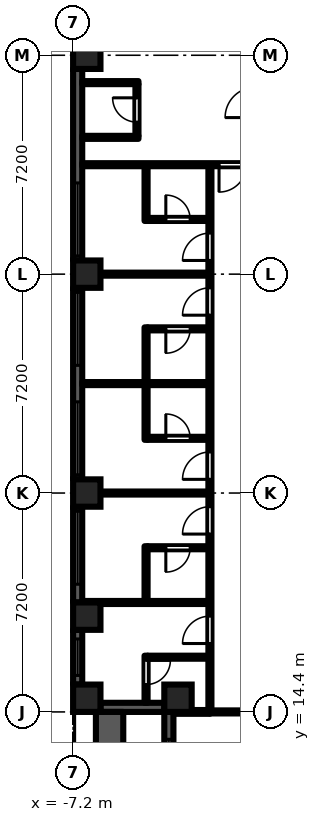
"""IFC4 building model, lengths in metres.
Left out: names, types, materials, properties, quantities, classifications, styles, units other than length and angle.
Written with IfcOpenShell. Run it as: python <this file> out.ifc"""

import sys

from ifc_helpers import new_model, si_unit, direction, frame, frame_2d, origin, origin_2d, place, context, subcontext, project, spatial, rectangle, extrude, element, fill, save


model = new_model("IFC4")
c1 = context("Model", 3, precision=1e-05, world=origin(), true_north=direction((0.0, 1.0)))
c2 = subcontext(c1, "Body", "Model", "MODEL_VIEW")
j1 = project(units=[si_unit("LENGTHUNIT", "METRE"), si_unit("PLANEANGLEUNIT", "RADIAN")], contexts=[c1])
p1 = place(None, origin())
s1 = spatial("IfcSite", under=j1, at=p1, CompositionType="ELEMENT")
p2 = place(p1, origin())
s2 = spatial("IfcBuilding", under=s1, at=p2, CompositionType="ELEMENT")
p3 = place(p2, frame((0.0, 0.0, 11.7)))
s3 = spatial("IfcBuildingStorey", under=s2, at=p3, CompositionType="ELEMENT", Elevation=11.7)
for number, where, z_axis, x_axis in (
    (1, (-6.75, 14.85, 0.0), (0.0, 0.0, 1.0), (1.0, 0.0, 0.0)),
    (2, (-6.75, 17.55, 0.0), (0.0, 0.0, 1.0), (1.0, 0.0, 0.0)),
    (3, (-6.75, 21.6, 0.0), (0.0, 0.0, 1.0), (1.0, 0.0, 0.0)),
    (4, (-6.75, 28.8, 0.0), (0.0, 0.0, 1.0), (1.0, 0.0, 0.0)),
    (5, (-6.75, 36.0, 0.0), (0.0, 0.0, 1.0), (1.0, 0.0, 0.0)),
    (6, (-3.75, 14.85, 0.0), (0.0, 0.0, 1.0), (1.0, 0.0, 0.0)),
):
    element("IfcColumn", number, at=place(p3, frame(where, z_axis=z_axis, x_axis=x_axis)), inside=s3, PredefinedType="COLUMN", context=c2, shape_type="SweptSolid", body=[
        extrude(rectangle(XDim=0.9, YDim=0.9, at=origin_2d()), origin(), (0.0, 0.0, 1.0), 3.0),
    ])
p4 = place(p3, frame((-7.05, 35.55, 0.0), z_axis=(0.0, 0.0, 1.0), x_axis=(0.0, -1.0, 0.0)))
e7 = element("IfcWall", 7, at=p4, inside=s3, PredefinedType="SOLIDWALL", context=c2, shape_type="SweptSolid", body=[
    extrude(rectangle(XDim=6.3, YDim=0.3, at=frame_2d((3.15, 0.0))), origin(), (0.0, 0.0, 1.0), 2.1),
])
p5 = place(p4, frame((3.75, 0.0, 0.2)))
e8 = element("IfcOpeningElement", 8, at=p5, cuts=e7, PredefinedType="OPENING", context=c2, shape_type="SweptSolid", body=[
    extrude(rectangle(XDim=2.4, YDim=1.85, at=frame_2d((1.2, 0.925))), frame((0.0, 0.16, 0.0), z_axis=(0.0, -1.0, 0.0), x_axis=(1.0, 0.0, 0.0)), (0.0, 0.0, 1.0), 0.32),
])
p6 = place(p3, frame((-7.05, 28.35, 0.0), z_axis=(0.0, 0.0, 1.0), x_axis=(0.0, -1.0, 0.0)))
e9 = element("IfcWall", 9, at=p6, inside=s3, PredefinedType="SOLIDWALL", context=c2, shape_type="SweptSolid", body=[
    extrude(rectangle(XDim=6.3, YDim=0.3, at=frame_2d((3.15, 0.0))), origin(), (0.0, 0.0, 1.0), 2.1),
])
p7 = place(p6, frame((0.15, 0.0, 0.2)))
e10 = element("IfcOpeningElement", 10, at=p7, cuts=e9, PredefinedType="OPENING", context=c2, shape_type="SweptSolid", body=[
    extrude(rectangle(XDim=2.4, YDim=1.85, at=frame_2d((1.2, 0.925))), frame((0.0, 0.16, 0.0), z_axis=(0.0, -1.0, 0.0), x_axis=(1.0, 0.0, 0.0)), (0.0, 0.0, 1.0), 0.32),
])
p8 = place(p6, frame((3.75, 0.0, 0.2)))
e11 = element("IfcOpeningElement", 11, at=p8, cuts=e9, PredefinedType="OPENING", context=c2, shape_type="SweptSolid", body=[
    extrude(rectangle(XDim=2.4, YDim=1.85, at=frame_2d((1.2, 0.925))), frame((0.0, 0.16, 0.0), z_axis=(0.0, -1.0, 0.0), x_axis=(1.0, 0.0, 0.0)), (0.0, 0.0, 1.0), 0.32),
])
p9 = place(p3, frame((-7.05, 21.15, 0.0), z_axis=(0.0, 0.0, 1.0), x_axis=(0.0, -1.0, 0.0)))
e12 = element("IfcWall", 12, at=p9, inside=s3, PredefinedType="SOLIDWALL", context=c2, shape_type="SweptSolid", body=[
    extrude(rectangle(XDim=3.15, YDim=0.3, at=frame_2d((1.575, 0.0))), origin(), (0.0, 0.0, 1.0), 2.1),
])
p10 = place(p9, frame((0.15, 0.0, 0.2)))
e13 = element("IfcOpeningElement", 13, at=p10, cuts=e12, PredefinedType="OPENING", context=c2, shape_type="SweptSolid", body=[
    extrude(rectangle(XDim=2.4, YDim=1.85, at=frame_2d((1.2, 0.925))), frame((0.0, 0.16, 0.0), z_axis=(0.0, -1.0, 0.0), x_axis=(1.0, 0.0, 0.0)), (0.0, 0.0, 1.0), 0.32),
])
p11 = place(p3, frame((-7.05, 17.1, 0.0), z_axis=(0.0, 0.0, 1.0), x_axis=(0.0, -1.0, 0.0)))
e14 = element("IfcWall", 14, at=p11, inside=s3, PredefinedType="SOLIDWALL", context=c2, shape_type="SweptSolid", body=[
    extrude(rectangle(XDim=1.8, YDim=0.3, at=frame_2d((0.9, 0.0))), origin(), (0.0, 0.0, 1.0), 2.1),
])
p12 = place(p11, frame((0.3, 0.0, 0.2)))
e15 = element("IfcOpeningElement", 15, at=p12, cuts=e14, PredefinedType="OPENING", context=c2, shape_type="SweptSolid", body=[
    extrude(rectangle(XDim=1.2, YDim=1.85, at=frame_2d((0.6, 0.925))), frame((0.0, 0.16, 0.0), z_axis=(0.0, -1.0, 0.0), x_axis=(1.0, 0.0, 0.0)), (0.0, 0.0, 1.0), 0.32),
])
p13 = place(p3, frame((-6.3, 14.55, 0.0), z_axis=(0.0, 0.0, 1.0), x_axis=(1.0, 0.0, 0.0)))
e16 = element("IfcWall", 16, at=p13, inside=s3, PredefinedType="SOLIDWALL", context=c2, shape_type="SweptSolid", body=[
    extrude(rectangle(XDim=2.1, YDim=0.3, at=frame_2d((1.05, 0.0))), origin(), (0.0, 0.0, 1.0), 2.1),
])
p14 = place(p3, frame((-4.05, 14.4, 0.0), z_axis=(0.0, 0.0, 1.0), x_axis=(0.0, -1.0, 0.0)))
e17 = element("IfcWall", 17, at=p14, inside=s3, PredefinedType="SOLIDWALL", context=c2, shape_type="SweptSolid", body=[
    extrude(rectangle(XDim=7.2, YDim=0.3, at=frame_2d((3.6, 0.0))), origin(), (0.0, 0.0, 1.0), 2.1),
])
p15 = place(p14, frame((3.0, 0.0, 0.0)))
e18 = element("IfcOpeningElement", 18, at=p15, cuts=e17, PredefinedType="OPENING", context=c2, shape_type="SweptSolid", body=[
    extrude(rectangle(XDim=1.2, YDim=2.05, at=frame_2d((0.6, 1.025))), frame((0.0, 0.16, 0.0), z_axis=(0.0, -1.0, 0.0), x_axis=(1.0, 0.0, 0.0)), (0.0, 0.0, 1.0), 0.32),
])
p16 = place(p14, frame((0.9, 0.0, 0.2)))
e19 = element("IfcOpeningElement", 19, at=p16, cuts=e17, PredefinedType="OPENING", context=c2, shape_type="SweptSolid", body=[
    extrude(rectangle(XDim=1.8, YDim=1.85, at=frame_2d((0.9, 0.925))), frame((0.0, 0.16, 0.0), z_axis=(0.0, -1.0, 0.0), x_axis=(1.0, 0.0, 0.0)), (0.0, 0.0, 1.0), 0.32),
])
p17 = place(p14, frame((4.5, 0.0, 0.2)))
e20 = element("IfcOpeningElement", 20, at=p17, cuts=e17, PredefinedType="OPENING", context=c2, shape_type="SweptSolid", body=[
    extrude(rectangle(XDim=1.8, YDim=1.85, at=frame_2d((0.9, 0.925))), frame((0.0, 0.16, 0.0), z_axis=(0.0, -1.0, 0.0), x_axis=(1.0, 0.0, 0.0)), (0.0, 0.0, 1.0), 0.32),
])
p18 = place(p3, frame((-6.0, 7.2, 0.0), z_axis=(0.0, 0.0, 1.0), x_axis=(0.0, 1.0, 0.0)))
e21 = element("IfcWall", 21, at=p18, inside=s3, PredefinedType="PARAPET", context=c2, shape_type="SweptSolid", body=[
    extrude(rectangle(XDim=7.2, YDim=0.9, at=frame_2d((3.6, 0.0))), origin(), (0.0, 0.0, 1.0), 0.8),
])
for number, where, z_axis, x_axis in (
    (22, (-6.9, 18.0, 0.0), (0.0, 0.0, 1.0), (1.0, 0.0, 0.0)),
    (23, (-6.9, 21.6, 0.0), (0.0, 0.0, 1.0), (1.0, 0.0, 0.0)),
    (24, (-6.9, 25.2, 0.0), (0.0, 0.0, 1.0), (1.0, 0.0, 0.0)),
    (25, (-6.9, 28.8, 0.0), (0.0, 0.0, 1.0), (1.0, 0.0, 0.0)),
):
    element("IfcWall", number, at=place(p3, frame(where, z_axis=z_axis, x_axis=x_axis)), inside=s3, PredefinedType="PARTITIONING", context=c2, shape_type="SweptSolid", body=[
        extrude(rectangle(XDim=4.15, YDim=0.1, at=frame_2d((2.075, 0.0))), origin(), (0.0, 0.0, 1.0), 2.575),
    ])
p19 = place(p3, frame((-6.9, 32.4, 0.0), z_axis=(0.0, 0.0, 1.0), x_axis=(1.0, 0.0, 0.0)))
e26 = element("IfcWall", 26, at=p19, inside=s3, PredefinedType="PARTITIONING", context=c2, shape_type="SweptSolid", body=[
    extrude(rectangle(XDim=5.625, YDim=0.1, at=frame_2d((2.812, 0.0))), origin(), (0.0, 0.0, 1.0), 2.575),
])
p20 = place(p19, frame((4.5, 0.0, 0.0)))
e27 = element("IfcOpeningElement", 27, at=p20, cuts=e26, PredefinedType="OPENING", context=c2, shape_type="SweptSolid", body=[
    extrude(rectangle(XDim=0.9, YDim=2.1, at=frame_2d((0.45, 1.05))), frame((0.0, 0.06, 0.0), z_axis=(0.0, -1.0, 0.0), x_axis=(1.0, 0.0, 0.0)), (0.0, 0.0, 1.0), 0.12),
])
for number, where, z_axis, x_axis in (
    (28, (-6.9, 33.3, 0.0), (0.0, 0.0, 1.0), (1.0, 0.0, 0.0)),
    (29, (-6.9, 35.1, 0.0), (0.0, 0.0, 1.0), (1.0, 0.0, 0.0)),
):
    element("IfcWall", number, at=place(p3, frame(where, z_axis=z_axis, x_axis=x_axis)), inside=s3, PredefinedType="PARTITIONING", context=c2, shape_type="SweptSolid", body=[
        extrude(rectangle(XDim=1.85, YDim=0.1, at=frame_2d((0.925, 0.0))), origin(), (0.0, 0.0, 1.0), 2.575),
    ])
p21 = place(p3, frame((-5.1, 33.35, 0.0), z_axis=(0.0, 0.0, 1.0), x_axis=(0.0, 1.0, 0.0)))
e30 = element("IfcWall", 30, at=p21, inside=s3, PredefinedType="PARTITIONING", context=c2, shape_type="SweptSolid", body=[
    extrude(rectangle(XDim=1.7, YDim=0.1, at=frame_2d((0.85, 0.0))), origin(), (0.0, 0.0, 1.0), 2.575),
])
p22 = place(p21, frame((0.45, 0.0, 0.0)))
e31 = element("IfcOpeningElement", 31, at=p22, cuts=e30, PredefinedType="OPENING", context=c2, shape_type="SweptSolid", body=[
    extrude(rectangle(XDim=0.8, YDim=2.1, at=frame_2d((0.4, 1.05))), frame((0.0, 0.06, 0.0), z_axis=(0.0, -1.0, 0.0), x_axis=(1.0, 0.0, 0.0)), (0.0, 0.0, 1.0), 0.12),
])
p23 = place(p3, frame((-4.8, 14.7, 0.0), z_axis=(0.0, 0.0, 1.0), x_axis=(0.0, 1.0, 0.0)))
e32 = element("IfcWall", 32, at=p23, inside=s3, PredefinedType="PARTITIONING", context=c2, shape_type="SweptSolid", body=[
    extrude(rectangle(XDim=1.55, YDim=0.1, at=frame_2d((0.775, 0.0))), origin(), (0.0, 0.0, 1.0), 2.575),
])
p24 = place(p23, frame((0.6, 0.0, 0.0)))
e33 = element("IfcOpeningElement", 33, at=p24, cuts=e32, PredefinedType="OPENING", context=c2, shape_type="SweptSolid", body=[
    extrude(rectangle(XDim=0.8, YDim=2.1, at=frame_2d((0.4, 1.05))), frame((0.0, 0.06, 0.0), z_axis=(0.0, -1.0, 0.0), x_axis=(1.0, 0.0, 0.0)), (0.0, 0.0, 1.0), 0.12),
])
p25 = place(p3, frame((-4.75, 16.2, 0.0), z_axis=(0.0, 0.0, 1.0), x_axis=(1.0, 0.0, 0.0)))
e34 = element("IfcWall", 34, at=p25, inside=s3, PredefinedType="PARTITIONING", context=c2, shape_type="SweptSolid", body=[
    extrude(rectangle(XDim=2.0, YDim=0.1, at=frame_2d((1.0, 0.0))), origin(), (0.0, 0.0, 1.0), 2.575),
])
p26 = place(p3, frame((-4.8, 18.05, 0.0), z_axis=(0.0, 0.0, 1.0), x_axis=(0.0, 1.0, 0.0)))
e35 = element("IfcWall", 35, at=p26, inside=s3, PredefinedType="PARTITIONING", context=c2, shape_type="SweptSolid", body=[
    extrude(rectangle(XDim=1.8, YDim=0.1, at=frame_2d((0.9, 0.0))), origin(), (0.0, 0.0, 1.0), 2.575),
])
p27 = place(p3, frame((-4.75, 19.8, 0.0), z_axis=(0.0, 0.0, 1.0), x_axis=(1.0, 0.0, 0.0)))
e36 = element("IfcWall", 36, at=p27, inside=s3, PredefinedType="PARTITIONING", context=c2, shape_type="SweptSolid", body=[
    extrude(rectangle(XDim=2.0, YDim=0.1, at=frame_2d((1.0, 0.0))), origin(), (0.0, 0.0, 1.0), 2.575),
])
p28 = place(p27, frame((0.6, 0.0, 0.0)))
e37 = element("IfcOpeningElement", 37, at=p28, cuts=e36, PredefinedType="OPENING", context=c2, shape_type="SweptSolid", body=[
    extrude(rectangle(XDim=0.8, YDim=2.1, at=frame_2d((0.4, 1.05))), frame((0.0, 0.06, 0.0), z_axis=(0.0, -1.0, 0.0), x_axis=(1.0, 0.0, 0.0)), (0.0, 0.0, 1.0), 0.12),
])
p29 = place(p3, frame((-4.8, 23.35, 0.0), z_axis=(0.0, 0.0, 1.0), x_axis=(0.0, 1.0, 0.0)))
e38 = element("IfcWall", 38, at=p29, inside=s3, PredefinedType="PARTITIONING", context=c2, shape_type="SweptSolid", body=[
    extrude(rectangle(XDim=3.7, YDim=0.1, at=frame_2d((1.85, 0.0))), origin(), (0.0, 0.0, 1.0), 2.575),
])
p30 = place(p3, frame((-4.75, 23.4, 0.0), z_axis=(0.0, 0.0, 1.0), x_axis=(1.0, 0.0, 0.0)))
e39 = element("IfcWall", 39, at=p30, inside=s3, PredefinedType="PARTITIONING", context=c2, shape_type="SweptSolid", body=[
    extrude(rectangle(XDim=2.0, YDim=0.1, at=frame_2d((1.0, 0.0))), origin(), (0.0, 0.0, 1.0), 2.575),
])
p31 = place(p30, frame((0.6, 0.0, 0.0)))
e40 = element("IfcOpeningElement", 40, at=p31, cuts=e39, PredefinedType="OPENING", context=c2, shape_type="SweptSolid", body=[
    extrude(rectangle(XDim=0.8, YDim=2.1, at=frame_2d((0.4, 1.05))), frame((0.0, 0.06, 0.0), z_axis=(0.0, -1.0, 0.0), x_axis=(1.0, 0.0, 0.0)), (0.0, 0.0, 1.0), 0.12),
])
p32 = place(p3, frame((-4.75, 27.0, 0.0), z_axis=(0.0, 0.0, 1.0), x_axis=(1.0, 0.0, 0.0)))
e41 = element("IfcWall", 41, at=p32, inside=s3, PredefinedType="PARTITIONING", context=c2, shape_type="SweptSolid", body=[
    extrude(rectangle(XDim=2.0, YDim=0.1, at=frame_2d((1.0, 0.0))), origin(), (0.0, 0.0, 1.0), 2.575),
])
p33 = place(p32, frame((0.6, 0.0, 0.0)))
e42 = element("IfcOpeningElement", 42, at=p33, cuts=e41, PredefinedType="OPENING", context=c2, shape_type="SweptSolid", body=[
    extrude(rectangle(XDim=0.8, YDim=2.1, at=frame_2d((0.4, 1.05))), frame((0.0, 0.06, 0.0), z_axis=(0.0, -1.0, 0.0), x_axis=(1.0, 0.0, 0.0)), (0.0, 0.0, 1.0), 0.12),
])
p34 = place(p3, frame((-4.8, 30.55, 0.0), z_axis=(0.0, 0.0, 1.0), x_axis=(0.0, 1.0, 0.0)))
e43 = element("IfcWall", 43, at=p34, inside=s3, PredefinedType="PARTITIONING", context=c2, shape_type="SweptSolid", body=[
    extrude(rectangle(XDim=1.8, YDim=0.1, at=frame_2d((0.9, 0.0))), origin(), (0.0, 0.0, 1.0), 2.575),
])
p35 = place(p3, frame((-4.75, 30.6, 0.0), z_axis=(0.0, 0.0, 1.0), x_axis=(1.0, 0.0, 0.0)))
e44 = element("IfcWall", 44, at=p35, inside=s3, PredefinedType="PARTITIONING", context=c2, shape_type="SweptSolid", body=[
    extrude(rectangle(XDim=2.0, YDim=0.1, at=frame_2d((1.0, 0.0))), origin(), (0.0, 0.0, 1.0), 2.575),
])
p36 = place(p35, frame((0.6, 0.0, 0.0)))
e45 = element("IfcOpeningElement", 45, at=p36, cuts=e44, PredefinedType="OPENING", context=c2, shape_type="SweptSolid", body=[
    extrude(rectangle(XDim=0.8, YDim=2.1, at=frame_2d((0.4, 1.05))), frame((0.0, 0.06, 0.0), z_axis=(0.0, -1.0, 0.0), x_axis=(1.0, 0.0, 0.0)), (0.0, 0.0, 1.0), 0.12),
])
p37 = place(p3, frame((-3.9, 14.4, 0.0), z_axis=(0.0, 0.0, 1.0), x_axis=(1.0, 0.0, 0.0)))
e46 = element("IfcWall", 46, at=p37, inside=s3, PredefinedType="PARTITIONING", context=c2, shape_type="SweptSolid", body=[
    extrude(rectangle(XDim=1.2, YDim=0.125, at=frame_2d((0.6, 0.0))), origin(), (0.0, 0.0, 1.0), 2.575),
])
p38 = place(p3, frame((-2.7, 14.462, 0.0), z_axis=(0.0, 0.0, 1.0), x_axis=(0.0, 1.0, 0.0)))
e47 = element("IfcWall", 47, at=p38, inside=s3, PredefinedType="PARTITIONING", context=c2, shape_type="SweptSolid", body=[
    extrude(rectangle(XDim=17.888, YDim=0.1, at=frame_2d((8.944, 0.0))), origin(), (0.0, 0.0, 1.0), 2.575),
])
p39 = place(p38, frame((2.188, 0.0, 0.0)))
e48 = element("IfcOpeningElement", 48, at=p39, cuts=e47, PredefinedType="OPENING", context=c2, shape_type="SweptSolid", body=[
    extrude(rectangle(XDim=0.9, YDim=2.1, at=frame_2d((0.45, 1.05))), frame((0.0, 0.06, 0.0), z_axis=(0.0, -1.0, 0.0), x_axis=(1.0, 0.0, 0.0)), (0.0, 0.0, 1.0), 0.12),
])
p40 = place(p38, frame((5.788, 0.0, 0.0)))
e49 = element("IfcOpeningElement", 49, at=p40, cuts=e47, PredefinedType="OPENING", context=c2, shape_type="SweptSolid", body=[
    extrude(rectangle(XDim=0.9, YDim=2.1, at=frame_2d((0.45, 1.05))), frame((0.0, 0.06, 0.0), z_axis=(0.0, -1.0, 0.0), x_axis=(1.0, 0.0, 0.0)), (0.0, 0.0, 1.0), 0.12),
])
p41 = place(p38, frame((7.587, 0.0, 0.0)))
e50 = element("IfcOpeningElement", 50, at=p41, cuts=e47, PredefinedType="OPENING", context=c2, shape_type="SweptSolid", body=[
    extrude(rectangle(XDim=0.9, YDim=2.1, at=frame_2d((0.45, 1.05))), frame((0.0, 0.06, 0.0), z_axis=(0.0, -1.0, 0.0), x_axis=(1.0, 0.0, 0.0)), (0.0, 0.0, 1.0), 0.12),
])
p42 = place(p38, frame((12.988, 0.0, 0.0)))
e51 = element("IfcOpeningElement", 51, at=p42, cuts=e47, PredefinedType="OPENING", context=c2, shape_type="SweptSolid", body=[
    extrude(rectangle(XDim=0.9, YDim=2.1, at=frame_2d((0.45, 1.05))), frame((0.0, 0.06, 0.0), z_axis=(0.0, -1.0, 0.0), x_axis=(1.0, 0.0, 0.0)), (0.0, 0.0, 1.0), 0.12),
])
p43 = place(p38, frame((14.788, 0.0, 0.0)))
e52 = element("IfcOpeningElement", 52, at=p43, cuts=e47, PredefinedType="OPENING", context=c2, shape_type="SweptSolid", body=[
    extrude(rectangle(XDim=0.9, YDim=2.1, at=frame_2d((0.45, 1.05))), frame((0.0, 0.06, 0.0), z_axis=(0.0, -1.0, 0.0), x_axis=(1.0, 0.0, 0.0)), (0.0, 0.0, 1.0), 0.12),
])
p44 = place(p3, frame((-2.7, 14.4, 0.0), z_axis=(0.0, 0.0, 1.0), x_axis=(1.0, 0.0, 0.0)))
e53 = element("IfcWall", 53, at=p44, inside=s3, PredefinedType="PARTITIONING", context=c2, shape_type="SweptSolid", body=[
    extrude(rectangle(XDim=1.425, YDim=0.1, at=frame_2d((0.712, 0.0))), origin(), (0.0, 0.0, 1.0), 2.575),
])
p45 = place(p5, origin())
e54 = element("IfcWindow", 54, at=p45, inside=s3, PartitioningType="SINGLE_PANEL", PredefinedType="WINDOW", context=c2, shape_type="SweptSolid", body=[
    extrude(rectangle(XDim=2.4, YDim=1.85, at=frame_2d((1.2, 0.925))), frame((0.0, 0.03, 0.0), z_axis=(0.0, -1.0, 0.0), x_axis=(1.0, 0.0, 0.0)), (0.0, 0.0, 1.0), 0.06),
])
fill(e8, e54)
p46 = place(p7, origin())
e55 = element("IfcWindow", 55, at=p46, inside=s3, PartitioningType="SINGLE_PANEL", PredefinedType="WINDOW", context=c2, shape_type="SweptSolid", body=[
    extrude(rectangle(XDim=2.4, YDim=1.85, at=frame_2d((1.2, 0.925))), frame((0.0, 0.03, 0.0), z_axis=(0.0, -1.0, 0.0), x_axis=(1.0, 0.0, 0.0)), (0.0, 0.0, 1.0), 0.06),
])
fill(e10, e55)
p47 = place(p8, origin())
e56 = element("IfcWindow", 56, at=p47, inside=s3, PartitioningType="SINGLE_PANEL", PredefinedType="WINDOW", context=c2, shape_type="SweptSolid", body=[
    extrude(rectangle(XDim=2.4, YDim=1.85, at=frame_2d((1.2, 0.925))), frame((0.0, 0.03, 0.0), z_axis=(0.0, -1.0, 0.0), x_axis=(1.0, 0.0, 0.0)), (0.0, 0.0, 1.0), 0.06),
])
fill(e11, e56)
p48 = place(p10, origin())
e57 = element("IfcWindow", 57, at=p48, inside=s3, PartitioningType="SINGLE_PANEL", PredefinedType="WINDOW", context=c2, shape_type="SweptSolid", body=[
    extrude(rectangle(XDim=2.4, YDim=1.85, at=frame_2d((1.2, 0.925))), frame((0.0, 0.03, 0.0), z_axis=(0.0, -1.0, 0.0), x_axis=(1.0, 0.0, 0.0)), (0.0, 0.0, 1.0), 0.06),
])
fill(e13, e57)
p49 = place(p12, origin())
e58 = element("IfcWindow", 58, at=p49, inside=s3, PartitioningType="SINGLE_PANEL", PredefinedType="WINDOW", context=c2, shape_type="SweptSolid", body=[
    extrude(rectangle(XDim=1.2, YDim=1.85, at=frame_2d((0.6, 0.925))), frame((0.0, 0.03, 0.0), z_axis=(0.0, -1.0, 0.0), x_axis=(1.0, 0.0, 0.0)), (0.0, 0.0, 1.0), 0.06),
])
fill(e15, e58)
p50 = place(p16, origin())
e59 = element("IfcWindow", 59, at=p50, inside=s3, PartitioningType="SINGLE_PANEL", PredefinedType="WINDOW", context=c2, shape_type="SweptSolid", body=[
    extrude(rectangle(XDim=1.8, YDim=1.85, at=frame_2d((0.9, 0.925))), frame((0.0, 0.03, 0.0), z_axis=(0.0, -1.0, 0.0), x_axis=(1.0, 0.0, 0.0)), (0.0, 0.0, 1.0), 0.06),
])
fill(e19, e59)
p51 = place(p22, origin())
e60 = element("IfcDoor", 60, at=p51, inside=s3, OperationType="SINGLE_SWING_RIGHT", PredefinedType="DOOR", context=c2, shape_type="SweptSolid", body=[
    extrude(rectangle(XDim=0.8, YDim=2.1, at=frame_2d((0.4, 1.05))), frame((0.0, 0.025, 0.0), z_axis=(0.0, -1.0, 0.0), x_axis=(1.0, 0.0, 0.0)), (0.0, 0.0, 1.0), 0.05),
])
fill(e31, e60)
p52 = place(p39, origin())
e61 = element("IfcDoor", 61, at=p52, inside=s3, OperationType="SINGLE_SWING_LEFT", PredefinedType="DOOR", context=c2, shape_type="SweptSolid", body=[
    extrude(rectangle(XDim=0.9, YDim=2.1, at=frame_2d((0.45, 1.05))), frame((0.0, 0.025, 0.0), z_axis=(0.0, -1.0, 0.0), x_axis=(1.0, 0.0, 0.0)), (0.0, 0.0, 1.0), 0.05),
])
fill(e48, e61)
p53 = place(p40, origin())
e62 = element("IfcDoor", 62, at=p53, inside=s3, OperationType="SINGLE_SWING_LEFT", PredefinedType="DOOR", context=c2, shape_type="SweptSolid", body=[
    extrude(rectangle(XDim=0.9, YDim=2.1, at=frame_2d((0.45, 1.05))), frame((0.0, 0.025, 0.0), z_axis=(0.0, -1.0, 0.0), x_axis=(1.0, 0.0, 0.0)), (0.0, 0.0, 1.0), 0.05),
])
fill(e49, e62)
p54 = place(p41, origin())
e63 = element("IfcDoor", 63, at=p54, inside=s3, OperationType="SINGLE_SWING_LEFT", PredefinedType="DOOR", context=c2, shape_type="SweptSolid", body=[
    extrude(rectangle(XDim=0.9, YDim=2.1, at=frame_2d((0.45, 1.05))), frame((0.0, 0.025, 0.0), z_axis=(0.0, -1.0, 0.0), x_axis=(1.0, 0.0, 0.0)), (0.0, 0.0, 1.0), 0.05),
])
fill(e50, e63)
p55 = place(p42, origin())
e64 = element("IfcDoor", 64, at=p55, inside=s3, OperationType="SINGLE_SWING_LEFT", PredefinedType="DOOR", context=c2, shape_type="SweptSolid", body=[
    extrude(rectangle(XDim=0.9, YDim=2.1, at=frame_2d((0.45, 1.05))), frame((0.0, 0.025, 0.0), z_axis=(0.0, -1.0, 0.0), x_axis=(1.0, 0.0, 0.0)), (0.0, 0.0, 1.0), 0.05),
])
fill(e51, e64)
p56 = place(p43, origin())
e65 = element("IfcDoor", 65, at=p56, inside=s3, OperationType="SINGLE_SWING_LEFT", PredefinedType="DOOR", context=c2, shape_type="SweptSolid", body=[
    extrude(rectangle(XDim=0.9, YDim=2.1, at=frame_2d((0.45, 1.05))), frame((0.0, 0.025, 0.0), z_axis=(0.0, -1.0, 0.0), x_axis=(1.0, 0.0, 0.0)), (0.0, 0.0, 1.0), 0.05),
])
fill(e52, e65)
p57 = place(p20, frame((0.9, 0.0, 0.0), z_axis=(0.0, 0.0, 1.0), x_axis=(-1.0, 0.0, 0.0)))
e66 = element("IfcDoor", 66, at=p57, inside=s3, OperationType="SINGLE_SWING_RIGHT", PredefinedType="DOOR", context=c2, shape_type="SweptSolid", body=[
    extrude(rectangle(XDim=0.9, YDim=2.1, at=frame_2d((0.45, 1.05))), frame((0.0, 0.025, 0.0), z_axis=(0.0, -1.0, 0.0), x_axis=(1.0, 0.0, 0.0)), (0.0, 0.0, 1.0), 0.05),
])
fill(e27, e66)
p58 = place(p24, frame((0.8, 0.0, 0.0), z_axis=(0.0, 0.0, 1.0), x_axis=(-1.0, 0.0, 0.0)))
e67 = element("IfcDoor", 67, at=p58, inside=s3, OperationType="SINGLE_SWING_LEFT", PredefinedType="DOOR", context=c2, shape_type="SweptSolid", body=[
    extrude(rectangle(XDim=0.8, YDim=2.1, at=frame_2d((0.4, 1.05))), frame((0.0, 0.025, 0.0), z_axis=(0.0, -1.0, 0.0), x_axis=(1.0, 0.0, 0.0)), (0.0, 0.0, 1.0), 0.05),
])
fill(e33, e67)
p59 = place(p28, frame((0.8, 0.0, 0.0), z_axis=(0.0, 0.0, 1.0), x_axis=(-1.0, 0.0, 0.0)))
e68 = element("IfcDoor", 68, at=p59, inside=s3, OperationType="SINGLE_SWING_RIGHT", PredefinedType="DOOR", context=c2, shape_type="SweptSolid", body=[
    extrude(rectangle(XDim=0.8, YDim=2.1, at=frame_2d((0.4, 1.05))), frame((0.0, 0.025, 0.0), z_axis=(0.0, -1.0, 0.0), x_axis=(1.0, 0.0, 0.0)), (0.0, 0.0, 1.0), 0.05),
])
fill(e37, e68)
p60 = place(p31, origin())
e69 = element("IfcDoor", 69, at=p60, inside=s3, OperationType="SINGLE_SWING_LEFT", PredefinedType="DOOR", context=c2, shape_type="SweptSolid", body=[
    extrude(rectangle(XDim=0.8, YDim=2.1, at=frame_2d((0.4, 1.05))), frame((0.0, 0.025, 0.0), z_axis=(0.0, -1.0, 0.0), x_axis=(1.0, 0.0, 0.0)), (0.0, 0.0, 1.0), 0.05),
])
fill(e40, e69)
p61 = place(p33, frame((0.8, 0.0, 0.0), z_axis=(0.0, 0.0, 1.0), x_axis=(-1.0, 0.0, 0.0)))
e70 = element("IfcDoor", 70, at=p61, inside=s3, OperationType="SINGLE_SWING_RIGHT", PredefinedType="DOOR", context=c2, shape_type="SweptSolid", body=[
    extrude(rectangle(XDim=0.8, YDim=2.1, at=frame_2d((0.4, 1.05))), frame((0.0, 0.025, 0.0), z_axis=(0.0, -1.0, 0.0), x_axis=(1.0, 0.0, 0.0)), (0.0, 0.0, 1.0), 0.05),
])
fill(e42, e70)
p62 = place(p36, origin())
e71 = element("IfcDoor", 71, at=p62, inside=s3, OperationType="SINGLE_SWING_LEFT", PredefinedType="DOOR", context=c2, shape_type="SweptSolid", body=[
    extrude(rectangle(XDim=0.8, YDim=2.1, at=frame_2d((0.4, 1.05))), frame((0.0, 0.025, 0.0), z_axis=(0.0, -1.0, 0.0), x_axis=(1.0, 0.0, 0.0)), (0.0, 0.0, 1.0), 0.05),
])
fill(e45, e71)
save(model, sys.argv[1])
